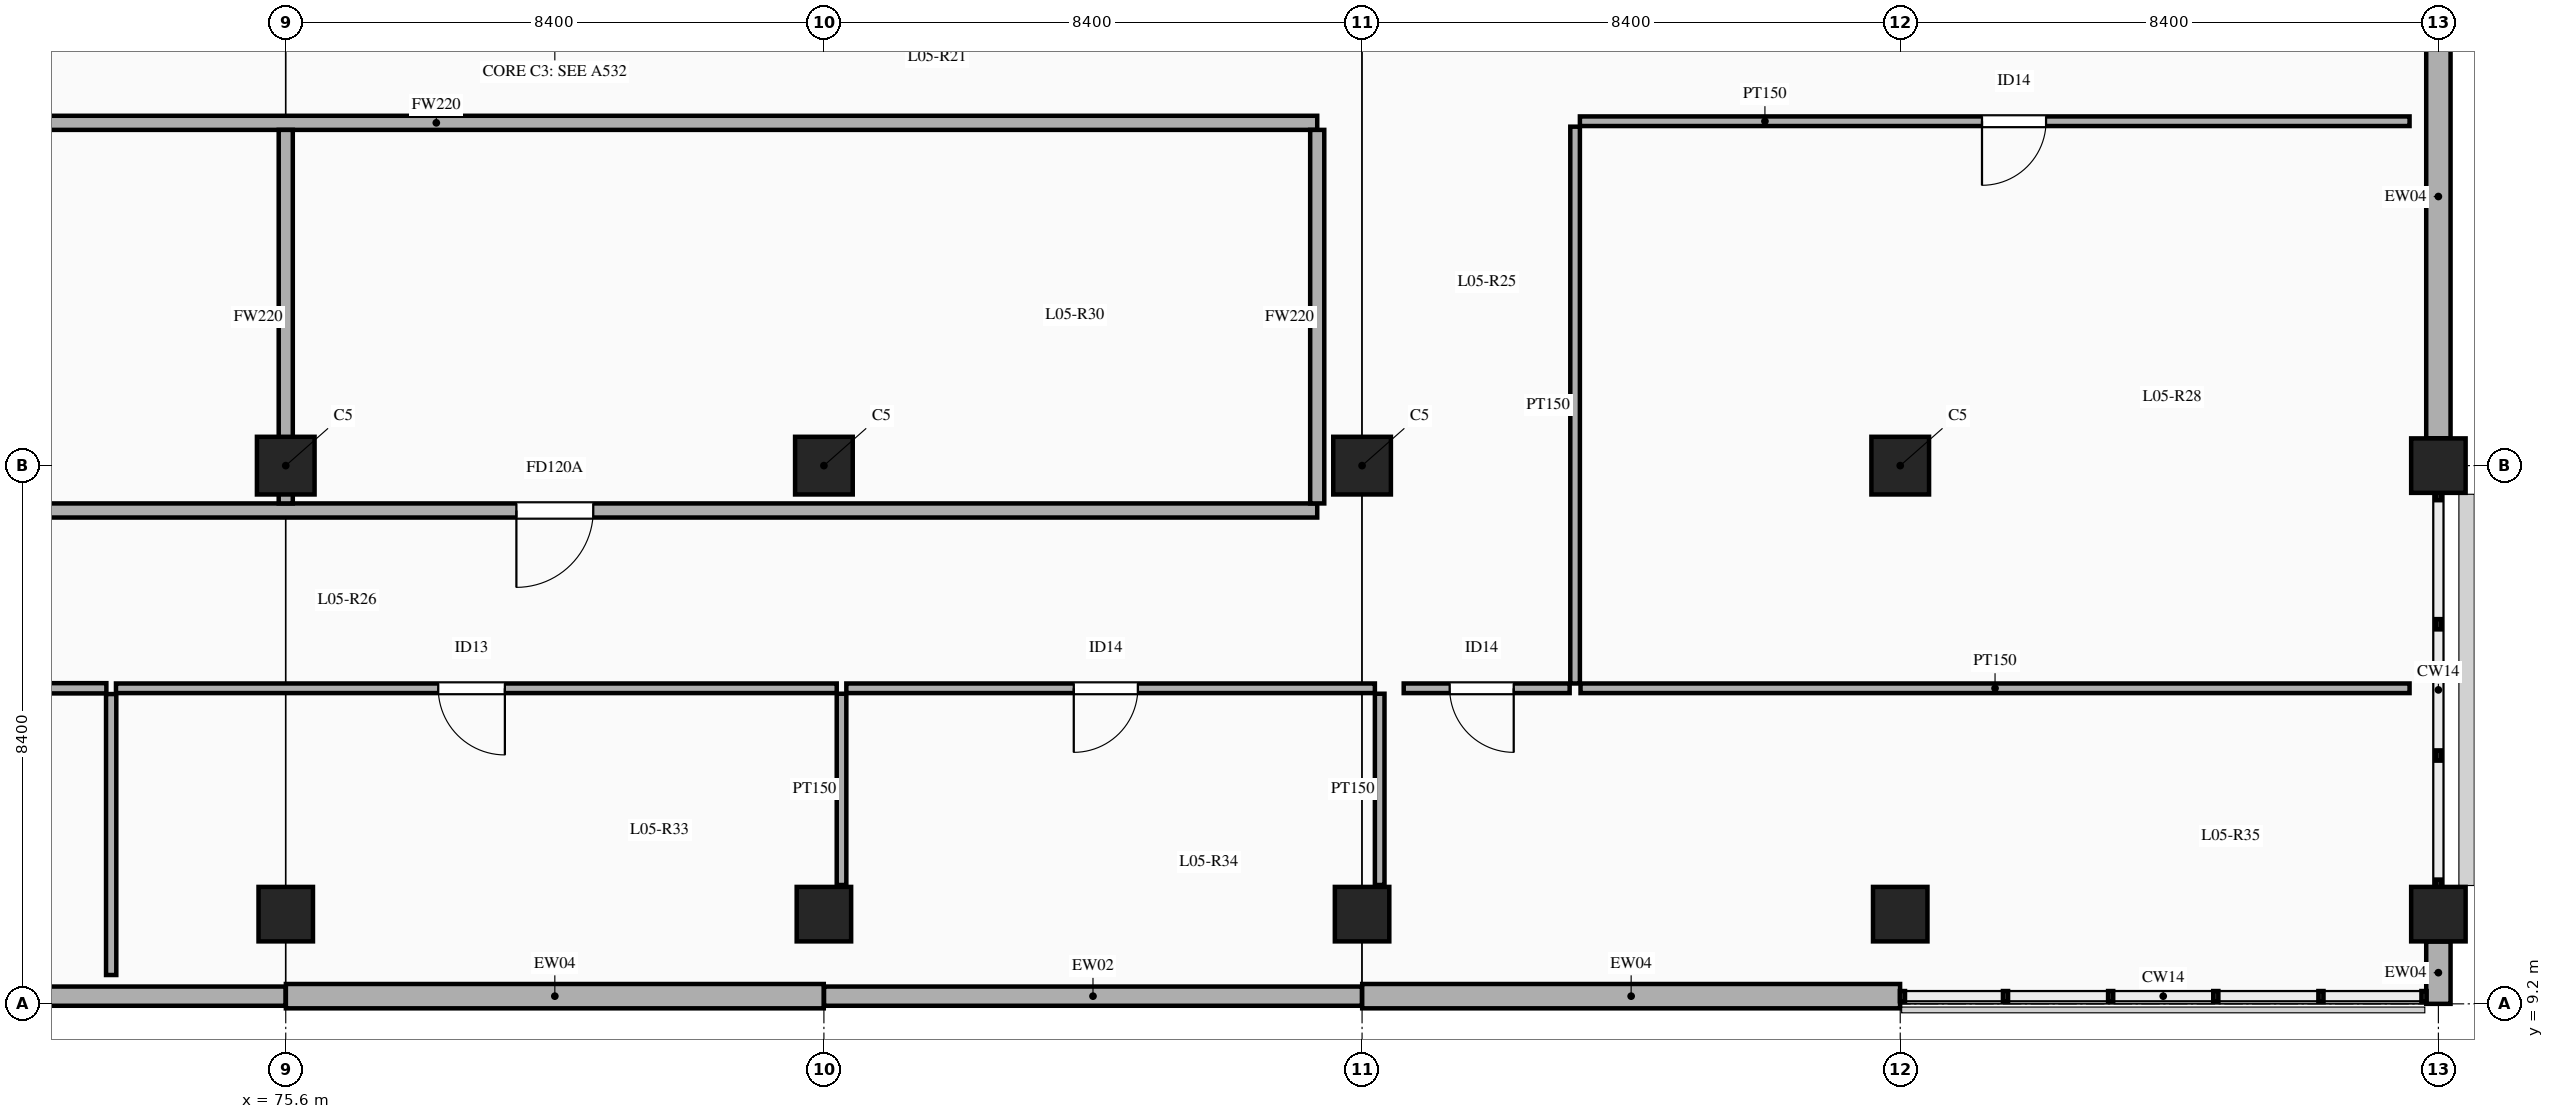
"""IFC4 building model, lengths in metres.
Left out: names, types, materials, properties, quantities, classifications, styles, units other than length and angle.
Written with IfcOpenShell. Run it as: python <this file> out.ifc"""

import sys

from ifc_helpers import new_model, si_unit, direction, frame, frame_2d, origin, origin_2d, place, context, subcontext, project, spatial, rectangle, extrude, element, fill, save


model = new_model("IFC4")
c1 = context("Model", 3, precision=1e-05, world=origin(), true_north=direction((0.0, 1.0)))
c2 = subcontext(c1, "Body", "Model", "MODEL_VIEW")
j1 = project(units=[si_unit("LENGTHUNIT", "METRE"), si_unit("PLANEANGLEUNIT", "RADIAN")], contexts=[c1])
p1 = place(None, origin())
s1 = spatial("IfcSite", under=j1, at=p1, CompositionType="ELEMENT")
p2 = place(p1, origin())
s2 = spatial("IfcBuilding", under=s1, at=p2, CompositionType="ELEMENT")
p3 = place(p2, frame((0.0, 0.0, 24.0)))
s3 = spatial("IfcBuildingStorey", under=s2, at=p3, CompositionType="ELEMENT", Elevation=24.0)
p4 = place(p3, frame((75.6, 10.6, 0.0), z_axis=(0.0, 0.0, 1.0), x_axis=(1.0, 0.0, 0.0)))
e1 = element("IfcColumn", 1, at=p4, inside=s3, PredefinedType="COLUMN", context=c2, shape_type="SweptSolid", body=[
    extrude(rectangle(XDim=0.85, YDim=0.85, at=origin_2d()), origin(), (0.0, 0.0, 1.0), 4.5),
])
p5 = place(p3, frame((75.6, 17.6, 0.0), z_axis=(0.0, 0.0, 1.0), x_axis=(1.0, 0.0, 0.0)))
e2 = element("IfcColumn", 2, at=p5, inside=s3, PredefinedType="COLUMN", context=c2, shape_type="SweptSolid", body=[
    extrude(rectangle(XDim=0.9, YDim=0.9, at=origin_2d()), origin(), (0.0, 0.0, 1.0), 4.5),
])
p6 = place(p3, frame((84.0, 10.6, 0.0), z_axis=(0.0, 0.0, 1.0), x_axis=(1.0, 0.0, 0.0)))
e3 = element("IfcColumn", 3, at=p6, inside=s3, PredefinedType="COLUMN", context=c2, shape_type="SweptSolid", body=[
    extrude(rectangle(XDim=0.85, YDim=0.85, at=origin_2d()), origin(), (0.0, 0.0, 1.0), 4.5),
])
p7 = place(p3, frame((84.0, 17.6, 0.0), z_axis=(0.0, 0.0, 1.0), x_axis=(1.0, 0.0, 0.0)))
e4 = element("IfcColumn", 4, at=p7, inside=s3, PredefinedType="COLUMN", context=c2, shape_type="SweptSolid", body=[
    extrude(rectangle(XDim=0.9, YDim=0.9, at=origin_2d()), origin(), (0.0, 0.0, 1.0), 4.5),
])
p8 = place(p3, frame((92.4, 10.6, 0.0), z_axis=(0.0, 0.0, 1.0), x_axis=(1.0, 0.0, 0.0)))
e5 = element("IfcColumn", 5, at=p8, inside=s3, PredefinedType="COLUMN", context=c2, shape_type="SweptSolid", body=[
    extrude(rectangle(XDim=0.85, YDim=0.85, at=origin_2d()), origin(), (0.0, 0.0, 1.0), 4.5),
])
p9 = place(p3, frame((92.4, 17.6, 0.0), z_axis=(0.0, 0.0, 1.0), x_axis=(1.0, 0.0, 0.0)))
e6 = element("IfcColumn", 6, at=p9, inside=s3, PredefinedType="COLUMN", context=c2, shape_type="SweptSolid", body=[
    extrude(rectangle(XDim=0.9, YDim=0.9, at=origin_2d()), origin(), (0.0, 0.0, 1.0), 4.5),
])
p10 = place(p3, frame((100.8, 10.6, 0.0), z_axis=(0.0, 0.0, 1.0), x_axis=(1.0, 0.0, 0.0)))
e7 = element("IfcColumn", 7, at=p10, inside=s3, PredefinedType="COLUMN", context=c2, shape_type="SweptSolid", body=[
    extrude(rectangle(XDim=0.85, YDim=0.85, at=origin_2d()), origin(), (0.0, 0.0, 1.0), 4.5),
])
p11 = place(p3, frame((100.8, 17.6, 0.0), z_axis=(0.0, 0.0, 1.0), x_axis=(1.0, 0.0, 0.0)))
e8 = element("IfcColumn", 8, at=p11, inside=s3, PredefinedType="COLUMN", context=c2, shape_type="SweptSolid", body=[
    extrude(rectangle(XDim=0.9, YDim=0.9, at=origin_2d()), origin(), (0.0, 0.0, 1.0), 4.5),
])
for number, where, z_axis, x_axis in (
    (9, (109.2, 10.6, 0.0), (0.0, 0.0, 1.0), (1.0, 0.0, 0.0)),
    (10, (109.2, 17.6, 0.0), (0.0, 0.0, 1.0), (1.0, 0.0, 0.0)),
):
    element("IfcColumn", number, at=place(p3, frame(where, z_axis=z_axis, x_axis=x_axis)), inside=s3, PredefinedType="COLUMN", context=c2, shape_type="SweptSolid", body=[
        extrude(rectangle(XDim=0.85, YDim=0.85, at=origin_2d()), origin(), (0.0, 0.0, 1.0), 4.5),
    ])
p12 = place(p3, frame((109.2, 9.2, 0.0), z_axis=(0.0, 0.0, 1.0), x_axis=(0.0, 1.0, 0.0)))
e11 = element("IfcWall", 11, at=p12, inside=s3, PredefinedType="SOLIDWALL", context=c2, shape_type="SweptSolid", body=[
    extrude(rectangle(XDim=0.973, YDim=0.38, at=frame_2d((0.487, 0.0))), origin(), (0.0, 0.0, 1.0), 3.55),
])
p13 = place(p3, frame((67.202, 9.32, 0.0), z_axis=(0.0, 0.0, 1.0), x_axis=(1.0, 0.0, 0.0)))
e12 = element("IfcWall", 12, at=p13, inside=s3, PredefinedType="SOLIDWALL", context=c2, shape_type="SweptSolid", body=[
    extrude(rectangle(XDim=8.396, YDim=0.3, at=frame_2d((4.198, 0.0))), origin(), (0.0, 0.0, 1.0), 3.55),
])
p14 = place(p3, frame((75.602, 9.32, 0.0), z_axis=(0.0, 0.0, 1.0), x_axis=(1.0, 0.0, 0.0)))
e13 = element("IfcWall", 13, at=p14, inside=s3, PredefinedType="SOLIDWALL", context=c2, shape_type="SweptSolid", body=[
    extrude(rectangle(XDim=8.396, YDim=0.38, at=frame_2d((4.198, 0.0))), origin(), (0.0, 0.0, 1.0), 3.55),
])
p15 = place(p3, frame((84.002, 9.32, 0.0), z_axis=(0.0, 0.0, 1.0), x_axis=(1.0, 0.0, 0.0)))
e14 = element("IfcWall", 14, at=p15, inside=s3, PredefinedType="SOLIDWALL", context=c2, shape_type="SweptSolid", body=[
    extrude(rectangle(XDim=8.396, YDim=0.3, at=frame_2d((4.198, 0.0))), origin(), (0.0, 0.0, 1.0), 3.55),
])
p16 = place(p3, frame((92.402, 9.32, 0.0), z_axis=(0.0, 0.0, 1.0), x_axis=(1.0, 0.0, 0.0)))
e15 = element("IfcWall", 15, at=p16, inside=s3, PredefinedType="SOLIDWALL", context=c2, shape_type="SweptSolid", body=[
    extrude(rectangle(XDim=8.396, YDim=0.38, at=frame_2d((4.198, 0.0))), origin(), (0.0, 0.0, 1.0), 3.55),
])
p17 = place(p3, frame((109.2, 18.027, 0.0), z_axis=(0.0, 0.0, 1.0), x_axis=(0.0, 1.0, 0.0)))
e16 = element("IfcWall", 16, at=p17, inside=s3, PredefinedType="SOLIDWALL", context=c2, shape_type="SweptSolid", body=[
    extrude(rectangle(XDim=7.546, YDim=0.38, at=frame_2d((3.773, 0.0))), origin(), (0.0, 0.0, 1.0), 3.55),
])
p18 = place(p3, frame((59.5, 22.95, 0.0), z_axis=(0.0, 0.0, 1.0), x_axis=(1.0, 0.0, 0.0)))
e17 = element("IfcWall", 17, at=p18, inside=s3, PredefinedType="SOLIDWALL", context=c2, shape_type="SweptSolid", body=[
    extrude(rectangle(XDim=32.2, YDim=0.22, at=frame_2d((16.1, 0.0))), origin(), (0.0, 0.0, 1.0), 3.45),
])
p19 = place(p18, frame((3.0, 0.0, 0.0)))
e18 = element("IfcOpeningElement", 18, at=p19, cuts=e17, PredefinedType="OPENING", context=c2, shape_type="SweptSolid", body=[
    extrude(rectangle(XDim=1.2, YDim=2.2, at=frame_2d((0.6, 1.1))), frame((0.0, 0.12, 0.0), z_axis=(0.0, -1.0, 0.0), x_axis=(1.0, 0.0, 0.0)), (0.0, 0.0, 1.0), 0.24),
])
p20 = place(p3, frame((59.5, 16.9, 0.0), z_axis=(0.0, 0.0, 1.0), x_axis=(1.0, 0.0, 0.0)))
e19 = element("IfcWall", 19, at=p20, inside=s3, PredefinedType="SOLIDWALL", context=c2, shape_type="SweptSolid", body=[
    extrude(rectangle(XDim=32.2, YDim=0.22, at=frame_2d((16.1, 0.0))), origin(), (0.0, 0.0, 1.0), 3.45),
])
p21 = place(p20, frame((19.7, 0.0, 0.0)))
e20 = element("IfcOpeningElement", 20, at=p21, cuts=e19, PredefinedType="OPENING", context=c2, shape_type="SweptSolid", body=[
    extrude(rectangle(XDim=1.2, YDim=2.2, at=frame_2d((0.6, 1.1))), frame((0.0, 0.12, 0.0), z_axis=(0.0, -1.0, 0.0), x_axis=(1.0, 0.0, 0.0)), (0.0, 0.0, 1.0), 0.24),
])
for number, where, z_axis, x_axis in (
    (21, (91.7, 17.01, 0.0), (0.0, 0.0, 1.0), (0.0, 1.0, 0.0)),
    (22, (75.6, 17.01, 0.0), (0.0, 0.0, 1.0), (0.0, 1.0, 0.0)),
):
    element("IfcWall", number, at=place(p3, frame(where, z_axis=z_axis, x_axis=x_axis)), inside=s3, PredefinedType="SOLIDWALL", context=c2, shape_type="SweptSolid", body=[
        extrude(rectangle(XDim=5.83, YDim=0.22, at=frame_2d((2.915, 0.0))), origin(), (0.0, 0.0, 1.0), 3.45),
    ])
p22 = place(p3, frame((95.8, 22.975, 0.0), z_axis=(0.0, 0.0, 1.0), x_axis=(1.0, 0.0, 0.0)))
e23 = element("IfcWall", 23, at=p22, inside=s3, PredefinedType="PARTITIONING", context=c2, shape_type="SweptSolid", body=[
    extrude(rectangle(XDim=12.95, YDim=0.15, at=frame_2d((6.475, 0.0))), origin(), (0.0, 0.0, 1.0), 3.45),
])
p23 = place(p22, frame((6.276, 0.0, 0.0)))
e24 = element("IfcOpeningElement", 24, at=p23, cuts=e23, PredefinedType="OPENING", context=c2, shape_type="SweptSolid", body=[
    extrude(rectangle(XDim=1.0, YDim=2.15, at=frame_2d((0.5, 1.075))), frame((0.0, 0.085, 0.0), z_axis=(0.0, -1.0, 0.0), x_axis=(1.0, 0.0, 0.0)), (0.0, 0.0, 1.0), 0.17),
])
p24 = place(p3, frame((95.725, 14.2, 0.0), z_axis=(0.0, 0.0, 1.0), x_axis=(0.0, 1.0, 0.0)))
e25 = element("IfcWall", 25, at=p24, inside=s3, PredefinedType="PARTITIONING", context=c2, shape_type="SweptSolid", body=[
    extrude(rectangle(XDim=8.69, YDim=0.15, at=frame_2d((4.345, 0.0))), origin(), (0.0, 0.0, 1.0), 3.45),
])
p25 = place(p3, frame((93.05, 14.125, 0.0), z_axis=(0.0, 0.0, 1.0), x_axis=(1.0, 0.0, 0.0)))
e26 = element("IfcWall", 26, at=p25, inside=s3, PredefinedType="PARTITIONING", context=c2, shape_type="SweptSolid", body=[
    extrude(rectangle(XDim=2.59, YDim=0.15, at=frame_2d((1.295, 0.0))), origin(), (0.0, 0.0, 1.0), 3.45),
])
p26 = place(p25, frame((0.717, 0.0, 0.0)))
e27 = element("IfcOpeningElement", 27, at=p26, cuts=e26, PredefinedType="OPENING", context=c2, shape_type="SweptSolid", body=[
    extrude(rectangle(XDim=1.0, YDim=2.15, at=frame_2d((0.5, 1.075))), frame((0.0, 0.085, 0.0), z_axis=(0.0, -1.0, 0.0), x_axis=(1.0, 0.0, 0.0)), (0.0, 0.0, 1.0), 0.17),
])
p27 = place(p3, frame((61.95, 14.125, 0.0), z_axis=(0.0, 0.0, 1.0), x_axis=(1.0, 0.0, 0.0)))
e28 = element("IfcWall", 28, at=p27, inside=s3, PredefinedType="PARTITIONING", context=c2, shape_type="SweptSolid", body=[
    extrude(rectangle(XDim=10.85, YDim=0.16, at=frame_2d((5.425, 0.0))), origin(), (0.0, 0.0, 1.0), 3.45),
])
p28 = place(p27, frame((4.78, 0.0, 0.0)))
e29 = element("IfcOpeningElement", 29, at=p28, cuts=e28, PredefinedType="OPENING", context=c2, shape_type="SweptSolid", body=[
    extrude(rectangle(XDim=1.14, YDim=2.22, at=frame_2d((0.57, 1.11))), frame((0.0, 0.09, 0.0), z_axis=(0.0, -1.0, 0.0), x_axis=(1.0, 0.0, 0.0)), (0.0, 0.0, 1.0), 0.18),
])
p29 = place(p3, frame((72.95, 14.125, 0.0), z_axis=(0.0, 0.0, 1.0), x_axis=(1.0, 0.0, 0.0)))
e30 = element("IfcWall", 30, at=p29, inside=s3, PredefinedType="PARTITIONING", context=c2, shape_type="SweptSolid", body=[
    extrude(rectangle(XDim=11.25, YDim=0.15, at=frame_2d((5.625, 0.0))), origin(), (0.0, 0.0, 1.0), 3.45),
])
p30 = place(p29, frame((5.03, 0.0, 0.0)))
e31 = element("IfcOpeningElement", 31, at=p30, cuts=e30, PredefinedType="OPENING", context=c2, shape_type="SweptSolid", body=[
    extrude(rectangle(XDim=1.04, YDim=2.15, at=frame_2d((0.52, 1.075))), frame((0.0, 0.085, 0.0), z_axis=(0.0, -1.0, 0.0), x_axis=(1.0, 0.0, 0.0)), (0.0, 0.0, 1.0), 0.17),
])
p31 = place(p3, frame((84.35, 14.125, 0.0), z_axis=(0.0, 0.0, 1.0), x_axis=(1.0, 0.0, 0.0)))
e32 = element("IfcWall", 32, at=p31, inside=s3, PredefinedType="PARTITIONING", context=c2, shape_type="SweptSolid", body=[
    extrude(rectangle(XDim=8.25, YDim=0.15, at=frame_2d((4.125, 0.0))), origin(), (0.0, 0.0, 1.0), 3.45),
])
p32 = place(p31, frame((3.55, 0.0, 0.0)))
e33 = element("IfcOpeningElement", 33, at=p32, cuts=e32, PredefinedType="OPENING", context=c2, shape_type="SweptSolid", body=[
    extrude(rectangle(XDim=1.0, YDim=2.15, at=frame_2d((0.5, 1.075))), frame((0.0, 0.085, 0.0), z_axis=(0.0, -1.0, 0.0), x_axis=(1.0, 0.0, 0.0)), (0.0, 0.0, 1.0), 0.17),
])
p33 = place(p3, frame((95.81, 14.125, 0.0), z_axis=(0.0, 0.0, 1.0), x_axis=(1.0, 0.0, 0.0)))
e34 = element("IfcWall", 34, at=p33, inside=s3, PredefinedType="PARTITIONING", context=c2, shape_type="SweptSolid", body=[
    extrude(rectangle(XDim=12.94, YDim=0.15, at=frame_2d((6.47, 0.0))), origin(), (0.0, 0.0, 1.0), 3.45),
])
p34 = place(p3, frame((72.875, 9.65, 0.0), z_axis=(0.0, 0.0, 1.0), x_axis=(0.0, 1.0, 0.0)))
e35 = element("IfcWall", 35, at=p34, inside=s3, PredefinedType="PARTITIONING", context=c2, shape_type="SweptSolid", body=[
    extrude(rectangle(XDim=4.385, YDim=0.16, at=frame_2d((2.192, 0.0))), origin(), (0.0, 0.0, 1.0), 3.45),
])
for number, where, z_axis, x_axis in (
    (36, (84.275, 11.055, 0.0), (0.0, 0.0, 1.0), (0.0, 1.0, 0.0)),
    (37, (92.675, 11.055, 0.0), (0.0, 0.0, 1.0), (0.0, 1.0, 0.0)),
):
    element("IfcWall", number, at=place(p3, frame(where, z_axis=z_axis, x_axis=x_axis)), inside=s3, PredefinedType="PARTITIONING", context=c2, shape_type="SweptSolid", body=[
        extrude(rectangle(XDim=2.985, YDim=0.15, at=frame_2d((1.493, 0.0))), origin(), (0.0, 0.0, 1.0), 3.45),
    ])
p35 = place(p21, frame((1.2, 0.0, 0.0), z_axis=(0.0, 0.0, 1.0), x_axis=(-1.0, 0.0, 0.0)))
e38 = element("IfcDoor", 38, at=p35, inside=s3, OperationType="SINGLE_SWING_RIGHT", PredefinedType="DOOR", context=c2, shape_type="SweptSolid", body=[
    extrude(rectangle(XDim=1.2, YDim=2.2, at=frame_2d((0.6, 1.1))), frame((0.0, 0.025, 0.0), z_axis=(0.0, -1.0, 0.0), x_axis=(1.0, 0.0, 0.0)), (0.0, 0.0, 1.0), 0.05),
])
fill(e20, e38)
p36 = place(p23, frame((1.0, 0.0, 0.0), z_axis=(0.0, 0.0, 1.0), x_axis=(-1.0, 0.0, 0.0)))
e39 = element("IfcDoor", 39, at=p36, inside=s3, OperationType="SINGLE_SWING_RIGHT", PredefinedType="DOOR", context=c2, shape_type="SweptSolid", body=[
    extrude(rectangle(XDim=1.0, YDim=2.15, at=frame_2d((0.5, 1.075))), frame((0.0, 0.025, 0.0), z_axis=(0.0, -1.0, 0.0), x_axis=(1.0, 0.0, 0.0)), (0.0, 0.0, 1.0), 0.05),
])
fill(e24, e39)
p37 = place(p30, frame((1.04, 0.0, 0.0), z_axis=(0.0, 0.0, 1.0), x_axis=(-1.0, 0.0, 0.0)))
e40 = element("IfcDoor", 40, at=p37, inside=s3, OperationType="SINGLE_SWING_LEFT", PredefinedType="DOOR", context=c2, shape_type="SweptSolid", body=[
    extrude(rectangle(XDim=1.04, YDim=2.15, at=frame_2d((0.52, 1.075))), frame((0.0, 0.025, 0.0), z_axis=(0.0, -1.0, 0.0), x_axis=(1.0, 0.0, 0.0)), (0.0, 0.0, 1.0), 0.05),
])
fill(e31, e40)
p38 = place(p32, frame((1.0, 0.0, 0.0), z_axis=(0.0, 0.0, 1.0), x_axis=(-1.0, 0.0, 0.0)))
e41 = element("IfcDoor", 41, at=p38, inside=s3, OperationType="SINGLE_SWING_RIGHT", PredefinedType="DOOR", context=c2, shape_type="SweptSolid", body=[
    extrude(rectangle(XDim=1.0, YDim=2.15, at=frame_2d((0.5, 1.075))), frame((0.0, 0.025, 0.0), z_axis=(0.0, -1.0, 0.0), x_axis=(1.0, 0.0, 0.0)), (0.0, 0.0, 1.0), 0.05),
])
fill(e33, e41)
p39 = place(p26, frame((1.0, 0.0, 0.0), z_axis=(0.0, 0.0, 1.0), x_axis=(-1.0, 0.0, 0.0)))
e42 = element("IfcDoor", 42, at=p39, inside=s3, OperationType="SINGLE_SWING_LEFT", PredefinedType="DOOR", context=c2, shape_type="SweptSolid", body=[
    extrude(rectangle(XDim=1.0, YDim=2.15, at=frame_2d((0.5, 1.075))), frame((0.0, 0.025, 0.0), z_axis=(0.0, -1.0, 0.0), x_axis=(1.0, 0.0, 0.0)), (0.0, 0.0, 1.0), 0.05),
])
fill(e27, e42)
save(model, sys.argv[1])
